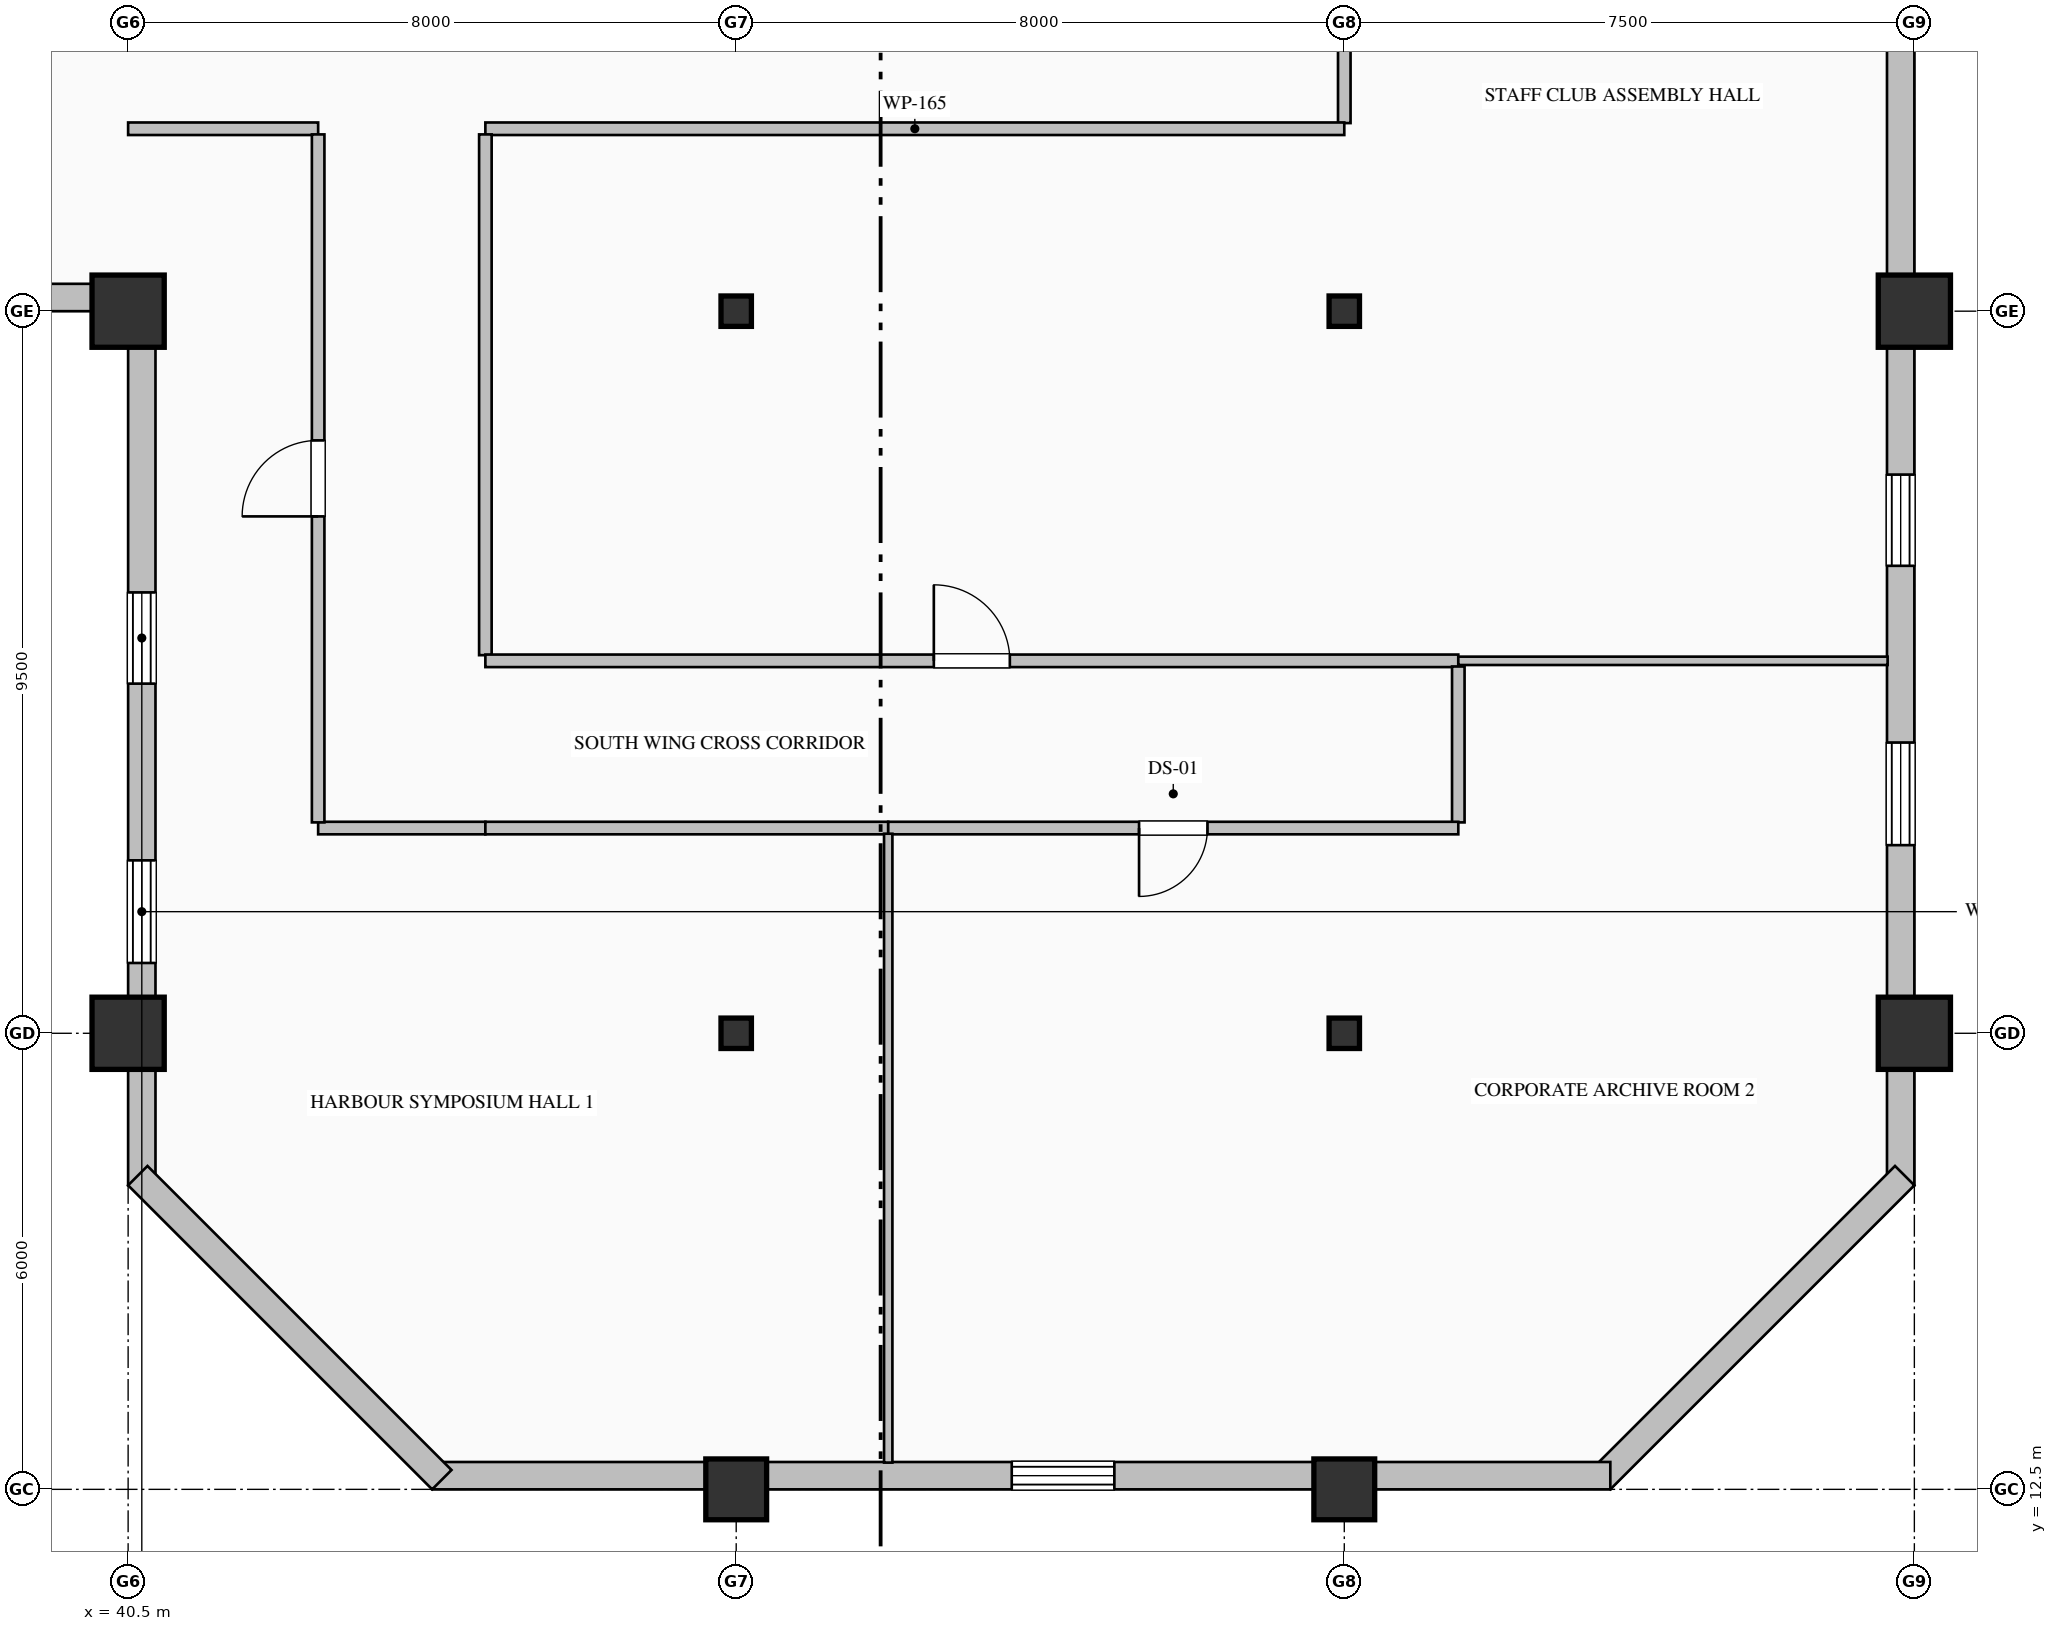
"""IFC4 building model, lengths in metres.
Left out: names, types, materials, properties, quantities, classifications, styles, units other than length and angle.
Written with IfcOpenShell. Run it as: python <this file> out.ifc"""

import sys

from ifc_helpers import new_model, si_unit, direction, frame, frame_2d, origin, origin_2d, place, context, subcontext, project, spatial, rectangle, hollow_rectangle, i_section, extrude, element, fill, save


model = new_model("IFC4")
c1 = context("Model", 3, precision=1e-05, world=origin(), true_north=direction((0.0, 1.0)))
c2 = subcontext(c1, "Body", "Model", "MODEL_VIEW")
j1 = project(units=[si_unit("LENGTHUNIT", "METRE"), si_unit("PLANEANGLEUNIT", "RADIAN")], contexts=[c1])
p1 = place(None, origin())
s1 = spatial("IfcSite", under=j1, at=p1, CompositionType="ELEMENT")
p2 = place(p1, origin())
s2 = spatial("IfcBuilding", under=s1, at=p2, CompositionType="ELEMENT")
p3 = place(p2, frame((0.0, 0.0, 229.8)))
s3 = spatial("IfcBuildingStorey", under=s2, at=p3, CompositionType="ELEMENT", Elevation=229.8)
for number, where, z_axis, x_axis in (
    (1, (40.5, 18.5, 0.0), (0.0, 0.0, 1.0), (1.0, 0.0, 0.0)),
    (2, (40.5, 28.0, 0.0), (0.0, 0.0, 1.0), (1.0, 0.0, 0.0)),
):
    element("IfcColumn", number, at=place(p3, frame(where, z_axis=z_axis, x_axis=x_axis)), inside=s3, PredefinedType="COLUMN", context=c2, shape_type="SweptSolid", body=[
        extrude(hollow_rectangle(XDim=0.95, YDim=0.95, WallThickness=0.036, at=origin_2d()), origin(), (0.0, 0.0, 1.0), 4.0),
    ])
p4 = place(p3, frame((48.5, 12.5, 0.0), z_axis=(0.0, 0.0, 1.0), x_axis=(1.0, 0.0, 0.0)))
e3 = element("IfcColumn", 3, at=p4, inside=s3, PredefinedType="COLUMN", context=c2, shape_type="SweptSolid", body=[
    extrude(hollow_rectangle(XDim=0.8, YDim=0.8, WallThickness=0.032, at=origin_2d()), origin(), (0.0, 0.0, 1.0), 4.0),
])
for number, where, z_axis, x_axis in (
    (4, (48.5, 18.5, 0.0), (0.0, 0.0, 1.0), (1.0, 0.0, 0.0)),
    (5, (48.5, 28.0, 0.0), (0.0, 0.0, 1.0), (1.0, 0.0, 0.0)),
):
    element("IfcColumn", number, at=place(p3, frame(where, z_axis=z_axis, x_axis=x_axis)), inside=s3, PredefinedType="COLUMN", context=c2, shape_type="SweptSolid", body=[
        extrude(i_section(OverallWidth=0.4, OverallDepth=0.4, WebThickness=0.013, FlangeThickness=0.021, FilletRadius=0.022, at=origin_2d()), origin(), (0.0, 0.0, 1.0), 4.0),
    ])
p5 = place(p3, frame((56.5, 12.5, 0.0), z_axis=(0.0, 0.0, 1.0), x_axis=(1.0, 0.0, 0.0)))
e6 = element("IfcColumn", 6, at=p5, inside=s3, PredefinedType="COLUMN", context=c2, shape_type="SweptSolid", body=[
    extrude(hollow_rectangle(XDim=0.8, YDim=0.8, WallThickness=0.032, at=origin_2d()), origin(), (0.0, 0.0, 1.0), 4.0),
])
for number, where, z_axis, x_axis in (
    (7, (56.5, 18.5, 0.0), (0.0, 0.0, 1.0), (1.0, 0.0, 0.0)),
    (8, (56.5, 28.0, 0.0), (0.0, 0.0, 1.0), (1.0, 0.0, 0.0)),
):
    element("IfcColumn", number, at=place(p3, frame(where, z_axis=z_axis, x_axis=x_axis)), inside=s3, PredefinedType="COLUMN", context=c2, shape_type="SweptSolid", body=[
        extrude(i_section(OverallWidth=0.4, OverallDepth=0.4, WebThickness=0.013, FlangeThickness=0.021, FilletRadius=0.022, at=origin_2d()), origin(), (0.0, 0.0, 1.0), 4.0),
    ])
for number, where, z_axis, x_axis in (
    (9, (64.0, 18.5, 0.0), (0.0, 0.0, 1.0), (1.0, 0.0, 0.0)),
    (10, (64.0, 28.0, 0.0), (0.0, 0.0, 1.0), (1.0, 0.0, 0.0)),
):
    element("IfcColumn", number, at=place(p3, frame(where, z_axis=z_axis, x_axis=x_axis)), inside=s3, PredefinedType="COLUMN", context=c2, shape_type="SweptSolid", body=[
        extrude(hollow_rectangle(XDim=0.95, YDim=0.95, WallThickness=0.036, at=origin_2d()), origin(), (0.0, 0.0, 1.0), 4.0),
    ])
p6 = place(p3, frame((40.68, 16.5, 0.0), z_axis=(0.0, 0.0, 1.0), x_axis=(0.0, 1.0, 0.0)))
e11 = element("IfcWall", 11, at=p6, inside=s3, PredefinedType="SOLIDWALL", context=c2, shape_type="SweptSolid", body=[
    extrude(rectangle(XDim=11.86, YDim=0.36, at=frame_2d((5.93, 0.0))), origin(), (0.0, 0.0, 1.0), 3.187),
])
p7 = place(p6, frame((2.925, 0.0, 0.9)))
e12 = element("IfcOpeningElement", 12, at=p7, cuts=e11, PredefinedType="OPENING", context=c2, shape_type="SweptSolid", body=[
    extrude(rectangle(XDim=1.35, YDim=1.85, at=frame_2d((0.675, 0.925))), frame((0.0, 0.19, 0.0), z_axis=(0.0, -1.0, 0.0), x_axis=(1.0, 0.0, 0.0)), (0.0, 0.0, 1.0), 0.38),
])
p8 = place(p6, frame((6.6, 0.0, 0.7)))
e13 = element("IfcOpeningElement", 13, at=p8, cuts=e11, PredefinedType="OPENING", context=c2, shape_type="SweptSolid", body=[
    extrude(rectangle(XDim=1.2, YDim=1.85, at=frame_2d((0.6, 0.925))), frame((0.0, 0.19, 0.0), z_axis=(0.0, -1.0, 0.0), x_axis=(1.0, 0.0, 0.0)), (0.0, 0.0, 1.0), 0.38),
])
p9 = place(p3, frame((40.52, 28.18, 0.0), z_axis=(0.0, 0.0, 1.0), x_axis=(-1.0, 0.0, 0.0)))
e14 = element("IfcWall", 14, at=p9, inside=s3, PredefinedType="SOLIDWALL", context=c2, shape_type="SweptSolid", body=[
    extrude(rectangle(XDim=27.52, YDim=0.36, at=frame_2d((13.76, 0.0))), origin(), (0.0, 0.0, 1.0), 3.187),
])
p10 = place(p9, frame((10.125, 0.0, 0.9)))
e15 = element("IfcOpeningElement", 15, at=p10, cuts=e14, PredefinedType="OPENING", context=c2, shape_type="SweptSolid", body=[
    extrude(rectangle(XDim=1.35, YDim=1.85, at=frame_2d((0.675, 0.925))), frame((0.0, 0.19, 0.0), z_axis=(0.0, -1.0, 0.0), x_axis=(1.0, 0.0, 0.0)), (0.0, 0.0, 1.0), 0.38),
])
p11 = place(p9, frame((13.8, 0.0, 0.7)))
e16 = element("IfcOpeningElement", 16, at=p11, cuts=e14, PredefinedType="OPENING", context=c2, shape_type="SweptSolid", body=[
    extrude(rectangle(XDim=1.2, YDim=1.85, at=frame_2d((0.6, 0.925))), frame((0.0, 0.19, 0.0), z_axis=(0.0, -1.0, 0.0), x_axis=(1.0, 0.0, 0.0)), (0.0, 0.0, 1.0), 0.38),
])
p12 = place(p9, frame((17.4, 0.0, 0.9)))
e17 = element("IfcOpeningElement", 17, at=p12, cuts=e14, PredefinedType="OPENING", context=c2, shape_type="SweptSolid", body=[
    extrude(rectangle(XDim=1.2, YDim=1.85, at=frame_2d((0.6, 0.925))), frame((0.0, 0.19, 0.0), z_axis=(0.0, -1.0, 0.0), x_axis=(1.0, 0.0, 0.0)), (0.0, 0.0, 1.0), 0.38),
])
p13 = place(p9, frame((20.925, 0.0, 0.9)))
e18 = element("IfcOpeningElement", 18, at=p13, cuts=e14, PredefinedType="OPENING", context=c2, shape_type="SweptSolid", body=[
    extrude(rectangle(XDim=1.35, YDim=1.85, at=frame_2d((0.675, 0.925))), frame((0.0, 0.19, 0.0), z_axis=(0.0, -1.0, 0.0), x_axis=(1.0, 0.0, 0.0)), (0.0, 0.0, 1.0), 0.38),
])
p14 = place(p3, frame((63.82, 36.05, 0.0), z_axis=(0.0, 0.0, 1.0), x_axis=(0.0, -1.0, 0.0)))
e19 = element("IfcWall", 19, at=p14, inside=s3, PredefinedType="SOLIDWALL", context=c2, shape_type="SweptSolid", body=[
    extrude(rectangle(XDim=19.55, YDim=0.36, at=frame_2d((9.775, 0.0))), origin(), (0.0, 0.0, 1.0), 3.325),
])
p15 = place(p14, frame((2.925, 0.0, 0.9)))
e20 = element("IfcOpeningElement", 20, at=p15, cuts=e19, PredefinedType="OPENING", context=c2, shape_type="SweptSolid", body=[
    extrude(rectangle(XDim=1.35, YDim=1.85, at=frame_2d((0.675, 0.925))), frame((0.0, 0.19, 0.0), z_axis=(0.0, -1.0, 0.0), x_axis=(1.0, 0.0, 0.0)), (0.0, 0.0, 1.0), 0.38),
])
p16 = place(p14, frame((10.2, 0.0, 0.9)))
e21 = element("IfcOpeningElement", 21, at=p16, cuts=e19, PredefinedType="OPENING", context=c2, shape_type="SweptSolid", body=[
    extrude(rectangle(XDim=1.2, YDim=1.85, at=frame_2d((0.6, 0.925))), frame((0.0, 0.19, 0.0), z_axis=(0.0, -1.0, 0.0), x_axis=(1.0, 0.0, 0.0)), (0.0, 0.0, 1.0), 0.38),
])
p17 = place(p14, frame((13.725, 0.0, 0.9)))
e22 = element("IfcOpeningElement", 22, at=p17, cuts=e19, PredefinedType="OPENING", context=c2, shape_type="SweptSolid", body=[
    extrude(rectangle(XDim=1.35, YDim=1.85, at=frame_2d((0.675, 0.925))), frame((0.0, 0.19, 0.0), z_axis=(0.0, -1.0, 0.0), x_axis=(1.0, 0.0, 0.0)), (0.0, 0.0, 1.0), 0.38),
])
p18 = place(p3, frame((63.873, 16.627, 0.0), z_axis=(0.0, 0.0, 1.0), x_axis=(-0.707106781187, -0.707106781187, 0.0)))
e23 = element("IfcWall", 23, at=p18, inside=s3, PredefinedType="SOLIDWALL", context=c2, shape_type="SweptSolid", body=[
    extrude(rectangle(XDim=5.657, YDim=0.36, at=frame_2d((2.828, 0.0))), origin(), (0.0, 0.0, 1.0), 3.775),
])
p19 = place(p3, frame((60.0, 12.68, 0.0), z_axis=(0.0, 0.0, 1.0), x_axis=(-1.0, 0.0, 0.0)))
e24 = element("IfcWall", 24, at=p19, inside=s3, PredefinedType="SOLIDWALL", context=c2, shape_type="SweptSolid", body=[
    extrude(rectangle(XDim=15.5, YDim=0.36, at=frame_2d((7.75, 0.0))), origin(), (0.0, 0.0, 1.0), 3.325),
])
p20 = place(p19, frame((6.525, 0.0, 0.9)))
e25 = element("IfcOpeningElement", 25, at=p20, cuts=e24, PredefinedType="OPENING", context=c2, shape_type="SweptSolid", body=[
    extrude(rectangle(XDim=1.35, YDim=1.85, at=frame_2d((0.675, 0.925))), frame((0.0, 0.19, 0.0), z_axis=(0.0, -1.0, 0.0), x_axis=(1.0, 0.0, 0.0)), (0.0, 0.0, 1.0), 0.38),
])
p21 = place(p3, frame((44.627, 12.627, 0.0), z_axis=(0.0, 0.0, 1.0), x_axis=(-0.707106781187, 0.707106781187, 0.0)))
e26 = element("IfcWall", 26, at=p21, inside=s3, PredefinedType="SOLIDWALL", context=c2, shape_type="SweptSolid", body=[
    extrude(rectangle(XDim=5.657, YDim=0.36, at=frame_2d((2.828, 0.0))), origin(), (0.0, 0.0, 1.0), 3.775),
])
p22 = place(p3, frame((56.5, 36.0, 0.0), z_axis=(0.0, 0.0, 1.0), x_axis=(0.0, -1.0, 0.0)))
e27 = element("IfcWall", 27, at=p22, inside=s3, PredefinedType="PARTITIONING", context=c2, shape_type="SweptSolid", body=[
    extrude(rectangle(XDim=5.525, YDim=0.165, at=frame_2d((2.763, 0.0))), origin(), (0.0, 0.0, 1.0), 3.179),
])
p23 = place(p3, frame((56.5, 30.4, 0.0), z_axis=(0.0, 0.0, 1.0), x_axis=(-1.0, 0.0, 0.0)))
e28 = element("IfcWall", 28, at=p23, inside=s3, PredefinedType="PARTITIONING", context=c2, shape_type="SweptSolid", body=[
    extrude(rectangle(XDim=11.3, YDim=0.165, at=frame_2d((5.65, 0.0))), origin(), (0.0, 0.0, 1.0), 3.775),
])
p24 = place(p3, frame((43.0, 30.4, 0.0), z_axis=(0.0, 0.0, 1.0), x_axis=(-1.0, 0.0, 0.0)))
e29 = element("IfcWall", 29, at=p24, inside=s3, PredefinedType="PARTITIONING", context=c2, shape_type="SweptSolid", body=[
    extrude(rectangle(XDim=2.5, YDim=0.165, at=frame_2d((1.25, 0.0))), origin(), (0.0, 0.0, 1.0), 3.775),
])
p25 = place(p3, frame((45.2, 30.325, 0.0), z_axis=(0.0, 0.0, 1.0), x_axis=(0.0, -1.0, 0.0)))
e30 = element("IfcWall", 30, at=p25, inside=s3, PredefinedType="PARTITIONING", context=c2, shape_type="SweptSolid", body=[
    extrude(rectangle(XDim=6.851, YDim=0.165, at=frame_2d((3.425, 0.0))), origin(), (0.0, 0.0, 1.0), 3.775),
])
p26 = place(p3, frame((45.2, 21.2, 0.0), z_axis=(0.0, 0.0, 1.0), x_axis=(-1.0, 0.0, 0.0)))
e31 = element("IfcWall", 31, at=p26, inside=s3, PredefinedType="PARTITIONING", context=c2, shape_type="SweptSolid", body=[
    extrude(rectangle(XDim=2.2, YDim=0.165, at=frame_2d((1.1, 0.0))), origin(), (0.0, 0.0, 1.0), 3.775),
])
p27 = place(p3, frame((43.0, 21.274, 0.0), z_axis=(0.0, 0.0, 1.0), x_axis=(0.0, 1.0, 0.0)))
e32 = element("IfcWall", 32, at=p27, inside=s3, PredefinedType="PARTITIONING", context=c2, shape_type="SweptSolid", body=[
    extrude(rectangle(XDim=9.051, YDim=0.165, at=frame_2d((4.525, 0.0))), origin(), (0.0, 0.0, 1.0), 3.775),
])
p28 = place(p27, frame((4.025, 0.0, 0.0)))
e33 = element("IfcOpeningElement", 33, at=p28, cuts=e32, PredefinedType="OPENING", context=c2, shape_type="SweptSolid", body=[
    extrude(rectangle(XDim=1.0, YDim=2.15, at=frame_2d((0.5, 1.075))), frame((0.0, 0.093, 0.0), z_axis=(0.0, -1.0, 0.0), x_axis=(1.0, 0.0, 0.0)), (0.0, 0.0, 1.0), 0.185),
])
p29 = place(p3, frame((45.2, 23.4, 0.0), z_axis=(0.0, 0.0, 1.0), x_axis=(1.0, 0.0, 0.0)))
e34 = element("IfcWall", 34, at=p29, inside=s3, PredefinedType="PARTITIONING", context=c2, shape_type="SweptSolid", body=[
    extrude(rectangle(XDim=12.8, YDim=0.165, at=frame_2d((6.4, 0.0))), origin(), (0.0, 0.0, 1.0), 3.467),
])
p30 = place(p29, frame((5.9, 0.0, 0.0)))
e35 = element("IfcOpeningElement", 35, at=p30, cuts=e34, PredefinedType="OPENING", context=c2, shape_type="SweptSolid", body=[
    extrude(rectangle(XDim=1.0, YDim=2.15, at=frame_2d((0.5, 1.075))), frame((0.0, 0.093, 0.0), z_axis=(0.0, -1.0, 0.0), x_axis=(1.0, 0.0, 0.0)), (0.0, 0.0, 1.0), 0.185),
])
p31 = place(p3, frame((50.5, 21.2, 0.0), z_axis=(0.0, 0.0, 1.0), x_axis=(-1.0, 0.0, 0.0)))
e36 = element("IfcWall", 36, at=p31, inside=s3, PredefinedType="PARTITIONING", context=c2, shape_type="SweptSolid", body=[
    extrude(rectangle(XDim=5.3, YDim=0.165, at=frame_2d((2.65, 0.0))), origin(), (0.0, 0.0, 1.0), 3.775),
])
p32 = place(p3, frame((58.0, 23.325, 0.0), z_axis=(0.0, 0.0, 1.0), x_axis=(0.0, -1.0, 0.0)))
e37 = element("IfcWall", 37, at=p32, inside=s3, PredefinedType="PARTITIONING", context=c2, shape_type="SweptSolid", body=[
    extrude(rectangle(XDim=2.051, YDim=0.165, at=frame_2d((1.025, 0.0))), origin(), (0.0, 0.0, 1.0), 3.775),
])
p33 = place(p3, frame((58.0, 21.2, 0.0), z_axis=(0.0, 0.0, 1.0), x_axis=(-1.0, 0.0, 0.0)))
e38 = element("IfcWall", 38, at=p33, inside=s3, PredefinedType="PARTITIONING", context=c2, shape_type="SweptSolid", body=[
    extrude(rectangle(XDim=7.5, YDim=0.165, at=frame_2d((3.75, 0.0))), origin(), (0.0, 0.0, 1.0), 3.775),
])
p34 = place(p33, frame((3.3, 0.0, 0.0)))
e39 = element("IfcOpeningElement", 39, at=p34, cuts=e38, PredefinedType="OPENING", context=c2, shape_type="SweptSolid", body=[
    extrude(rectangle(XDim=0.9, YDim=2.15, at=frame_2d((0.45, 1.075))), frame((0.0, 0.093, 0.0), z_axis=(0.0, -1.0, 0.0), x_axis=(1.0, 0.0, 0.0)), (0.0, 0.0, 1.0), 0.185),
])
p35 = place(p3, frame((63.648, 23.4, 0.0), z_axis=(0.0, 0.0, 1.0), x_axis=(-1.0, 0.0, 0.0)))
e40 = element("IfcWall", 40, at=p35, inside=s3, PredefinedType="MOVABLE", context=c2, shape_type="SweptSolid", body=[
    extrude(rectangle(XDim=5.648, YDim=0.11, at=frame_2d((2.824, 0.0))), origin(), (0.0, 0.0, 1.0), 3.775),
])
p36 = place(p3, frame((50.5, 21.125, 0.0), z_axis=(0.0, 0.0, 1.0), x_axis=(0.0, -1.0, 0.0)))
e41 = element("IfcWall", 41, at=p36, inside=s3, PredefinedType="MOVABLE", context=c2, shape_type="SweptSolid", body=[
    extrude(rectangle(XDim=8.273, YDim=0.11, at=frame_2d((4.137, 0.0))), origin(), (0.0, 0.0, 1.0), 3.775),
])
p37 = place(p7, origin())
e42 = element("IfcWindow", 42, at=p37, inside=s3, PartitioningType="DOUBLE_PANEL_VERTICAL", PredefinedType="WINDOW", context=c2, shape_type="SweptSolid", body=[
    extrude(rectangle(XDim=1.35, YDim=1.85, at=frame_2d((0.675, 0.925))), frame((0.0, 0.15, 0.0), z_axis=(0.0, -1.0, 0.0), x_axis=(1.0, 0.0, 0.0)), (0.0, 0.0, 1.0), 0.06),
])
fill(e12, e42)
p38 = place(p8, origin())
e43 = element("IfcWindow", 43, at=p38, inside=s3, PartitioningType="DOUBLE_PANEL_VERTICAL", PredefinedType="WINDOW", context=c2, shape_type="SweptSolid", body=[
    extrude(rectangle(XDim=1.2, YDim=1.85, at=frame_2d((0.6, 0.925))), frame((0.0, 0.15, 0.0), z_axis=(0.0, -1.0, 0.0), x_axis=(1.0, 0.0, 0.0)), (0.0, 0.0, 1.0), 0.06),
])
fill(e13, e43)
p39 = place(p16, origin())
e44 = element("IfcWindow", 44, at=p39, inside=s3, PartitioningType="DOUBLE_PANEL_VERTICAL", PredefinedType="WINDOW", context=c2, shape_type="SweptSolid", body=[
    extrude(rectangle(XDim=1.2, YDim=1.85, at=frame_2d((0.6, 0.925))), frame((0.0, 0.15, 0.0), z_axis=(0.0, -1.0, 0.0), x_axis=(1.0, 0.0, 0.0)), (0.0, 0.0, 1.0), 0.06),
])
fill(e21, e44)
p40 = place(p17, origin())
e45 = element("IfcWindow", 45, at=p40, inside=s3, PartitioningType="DOUBLE_PANEL_VERTICAL", PredefinedType="WINDOW", context=c2, shape_type="SweptSolid", body=[
    extrude(rectangle(XDim=1.35, YDim=1.85, at=frame_2d((0.675, 0.925))), frame((0.0, 0.15, 0.0), z_axis=(0.0, -1.0, 0.0), x_axis=(1.0, 0.0, 0.0)), (0.0, 0.0, 1.0), 0.06),
])
fill(e22, e45)
p41 = place(p20, origin())
e46 = element("IfcWindow", 46, at=p41, inside=s3, PartitioningType="DOUBLE_PANEL_VERTICAL", PredefinedType="WINDOW", context=c2, shape_type="SweptSolid", body=[
    extrude(rectangle(XDim=1.35, YDim=1.85, at=frame_2d((0.675, 0.925))), frame((0.0, 0.15, 0.0), z_axis=(0.0, -1.0, 0.0), x_axis=(1.0, 0.0, 0.0)), (0.0, 0.0, 1.0), 0.06),
])
fill(e25, e46)
p42 = place(p30, origin())
e47 = element("IfcDoor", 47, at=p42, inside=s3, OperationType="SINGLE_SWING_LEFT", PredefinedType="DOOR", context=c2, shape_type="SweptSolid", body=[
    extrude(rectangle(XDim=1.0, YDim=2.15, at=frame_2d((0.5, 1.075))), frame((0.0, 0.025, 0.0), z_axis=(0.0, -1.0, 0.0), x_axis=(1.0, 0.0, 0.0)), (0.0, 0.0, 1.0), 0.05),
])
fill(e35, e47)
p43 = place(p28, origin())
e48 = element("IfcDoor", 48, at=p43, inside=s3, OperationType="SINGLE_SWING_LEFT", PredefinedType="DOOR", context=c2, shape_type="SweptSolid", body=[
    extrude(rectangle(XDim=1.0, YDim=2.15, at=frame_2d((0.5, 1.075))), frame((0.0, 0.025, 0.0), z_axis=(0.0, -1.0, 0.0), x_axis=(1.0, 0.0, 0.0)), (0.0, 0.0, 1.0), 0.05),
])
fill(e33, e48)
p44 = place(p34, origin())
e49 = element("IfcDoor", 49, at=p44, inside=s3, OperationType="SINGLE_SWING_RIGHT", PredefinedType="DOOR", context=c2, shape_type="SweptSolid", body=[
    extrude(rectangle(XDim=0.9, YDim=2.15, at=frame_2d((0.45, 1.075))), frame((0.0, 0.025, 0.0), z_axis=(0.0, -1.0, 0.0), x_axis=(1.0, 0.0, 0.0)), (0.0, 0.0, 1.0), 0.05),
])
fill(e39, e49)
save(model, sys.argv[1])
